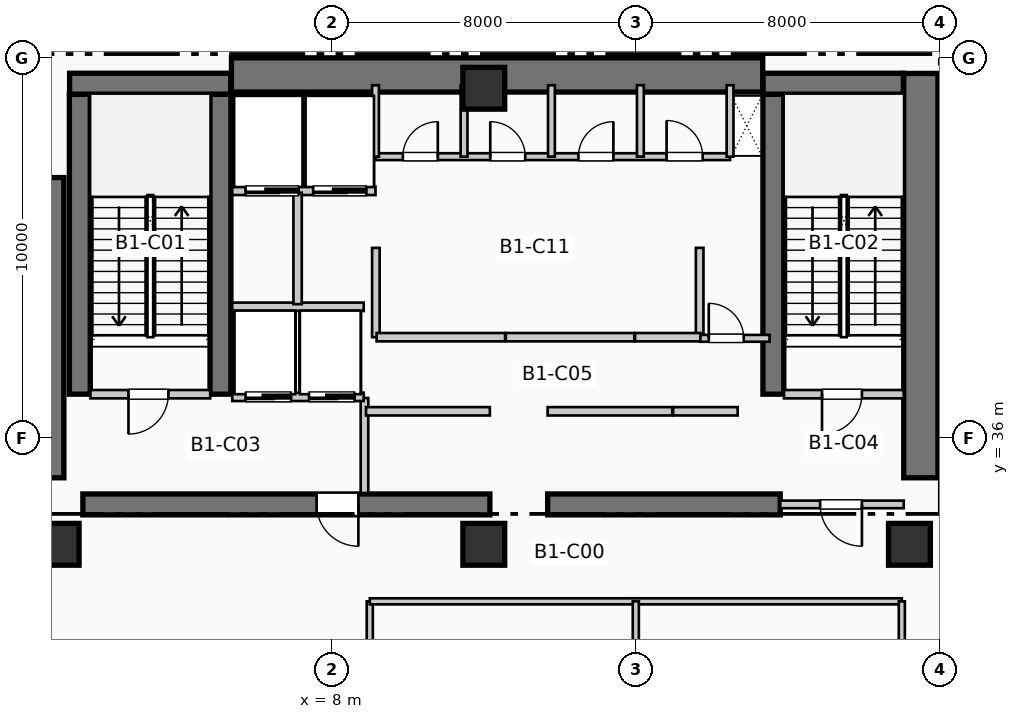
"""IFC4 building model, lengths in metres.
Left out: names, types, materials, properties, quantities, classifications, styles, units other than length and angle.
Written with IfcOpenShell. Run it as: python <this file> out.ifc"""

import sys

from ifc_helpers import new_model, si_unit, direction, frame, frame_2d, origin, origin_2d, place, context, subcontext, project, spatial, rectangle, extrude, element, fill, save


model = new_model("IFC4")
c1 = context("Model", 3, precision=1e-05, world=origin(), true_north=direction((0.0, 1.0)))
c2 = subcontext(c1, "Body", "Model", "MODEL_VIEW")
j1 = project(units=[si_unit("LENGTHUNIT", "METRE"), si_unit("PLANEANGLEUNIT", "RADIAN")], contexts=[c1])
p1 = place(None, origin())
s1 = spatial("IfcSite", under=j1, at=p1, CompositionType="ELEMENT")
p2 = place(p1, origin())
s2 = spatial("IfcBuilding", under=s1, at=p2, CompositionType="ELEMENT")
p3 = place(p2, frame((0.0, 0.0, -4.62)))
s3 = spatial("IfcBuildingStorey", under=s2, at=p3, CompositionType="ELEMENT", Elevation=-4.62)
p4 = place(p3, frame((5.36, 45.55, 0.0), z_axis=(0.0, 0.0, 1.0), x_axis=(1.0, 0.0, 0.0)))
e1 = element("IfcWall", 1, at=p4, inside=s3, PredefinedType="SHEAR", context=c2, shape_type="SweptSolid", body=[
    extrude(rectangle(XDim=13.98, YDim=0.9, at=frame_2d((6.99, 0.0))), origin(), (0.0, 0.0, 1.0), 4.62),
])
p5 = place(p3, frame((0.5, 34.95, 0.0), z_axis=(0.0, 0.0, 1.0), x_axis=(0.0, 1.0, 0.0)))
e2 = element("IfcWall", 2, at=p5, inside=s3, PredefinedType="SHEAR", context=c2, shape_type="SweptSolid", body=[
    extrude(rectangle(XDim=7.9, YDim=0.9, at=frame_2d((3.95, 0.0))), origin(), (0.0, 0.0, 1.0), 4.62),
])
p6 = place(p3, frame((23.5, 34.95, 0.0), z_axis=(0.0, 0.0, 1.0), x_axis=(0.0, 1.0, 0.0)))
e3 = element("IfcWall", 3, at=p6, inside=s3, PredefinedType="SHEAR", context=c2, shape_type="SweptSolid", body=[
    extrude(rectangle(XDim=10.64, YDim=0.9, at=frame_2d((5.32, 0.0))), origin(), (0.0, 0.0, 1.0), 4.62),
])
p7 = place(p3, frame((1.45, 34.25, 0.0), z_axis=(0.0, 0.0, 1.0), x_axis=(1.0, 0.0, 0.0)))
e4 = element("IfcWall", 4, at=p7, inside=s3, PredefinedType="SHEAR", context=c2, shape_type="SweptSolid", body=[
    extrude(rectangle(XDim=10.71, YDim=0.55, at=frame_2d((5.355, 0.0))), origin(), (0.0, 0.0, 1.0), 4.62),
])
p8 = place(p7, frame((7.25, 0.0, 0.0), z_axis=(0.0, 0.0, 1.0), x_axis=(-1.0, 0.0, 0.0)))
e5 = element("IfcOpeningElement", 5, at=p8, cuts=e4, PredefinedType="OPENING", context=c2, shape_type="SweptSolid", body=[
    extrude(rectangle(XDim=1.1, YDim=2.15, at=frame_2d((0.55, 1.075))), frame((0.0, 0.285, 0.0), z_axis=(0.0, -1.0, 0.0), x_axis=(1.0, 0.0, 0.0)), (0.0, 0.0, 1.0), 0.57),
])
p9 = place(p3, frame((13.68, 34.25, 0.0), z_axis=(0.0, 0.0, 1.0), x_axis=(1.0, 0.0, 0.0)))
e6 = element("IfcWall", 6, at=p9, inside=s3, PredefinedType="SHEAR", context=c2, shape_type="SweptSolid", body=[
    extrude(rectangle(XDim=6.12, YDim=0.55, at=frame_2d((3.06, 0.0))), origin(), (0.0, 0.0, 1.0), 4.62),
])
for number, where, z_axis, x_axis in (
    (7, (1.37, 37.15, 0.0), (0.0, 0.0, 1.0), (0.0, 1.0, 0.0)),
    (8, (5.07, 37.15, 0.0), (0.0, 0.0, 1.0), (0.0, 1.0, 0.0)),
):
    element("IfcWall", number, at=place(p3, frame(where, z_axis=z_axis, x_axis=x_axis)), inside=s3, PredefinedType="SHEAR", context=c2, shape_type="SweptSolid", body=[
        extrude(rectangle(XDim=7.89, YDim=0.55, at=frame_2d((3.945, 0.0))), origin(), (0.0, 0.0, 1.0), 4.62),
    ])
p10 = place(p3, frame((1.1, 45.32, 0.0), z_axis=(0.0, 0.0, 1.0), x_axis=(1.0, 0.0, 0.0)))
e9 = element("IfcWall", 9, at=p10, inside=s3, PredefinedType="SHEAR", context=c2, shape_type="SweptSolid", body=[
    extrude(rectangle(XDim=4.24, YDim=0.55, at=frame_2d((2.12, 0.0))), origin(), (0.0, 0.0, 1.0), 4.62),
])
p11 = place(p3, frame((19.62, 37.15, 0.0), z_axis=(0.0, 0.0, 1.0), x_axis=(0.0, 1.0, 0.0)))
e10 = element("IfcWall", 10, at=p11, inside=s3, PredefinedType="SHEAR", context=c2, shape_type="SweptSolid", body=[
    extrude(rectangle(XDim=7.89, YDim=0.55, at=frame_2d((3.945, 0.0))), origin(), (0.0, 0.0, 1.0), 4.62),
])
p12 = place(p3, frame((19.35, 45.32, 0.0), z_axis=(0.0, 0.0, 1.0), x_axis=(1.0, 0.0, 0.0)))
e11 = element("IfcWall", 11, at=p12, inside=s3, PredefinedType="SHEAR", context=c2, shape_type="SweptSolid", body=[
    extrude(rectangle(XDim=3.69, YDim=0.55, at=frame_2d((1.845, 0.0))), origin(), (0.0, 0.0, 1.0), 4.62),
])
for number, where, z_axis, x_axis in (
    (12, (0.8, 33.2, 0.0), (0.0, 0.0, 1.0), (1.0, 0.0, 0.0)),
    (13, (12.0, 33.2, 0.0), (0.0, 0.0, 1.0), (1.0, 0.0, 0.0)),
    (14, (12.0, 45.2, 0.0), (0.0, 0.0, 1.0), (1.0, 0.0, 0.0)),
    (15, (23.2, 33.2, 0.0), (0.0, 0.0, 1.0), (1.0, 0.0, 0.0)),
):
    element("IfcColumn", number, at=place(p3, frame(where, z_axis=z_axis, x_axis=x_axis)), inside=s3, PredefinedType="COLUMN", context=c2, shape_type="SweptSolid", body=[
        extrude(rectangle(XDim=1.1, YDim=1.1, at=origin_2d()), origin(), (0.0, 0.0, 1.0), 4.62),
    ])
p13 = place(p3, frame((1.65, 37.15, 0.0), z_axis=(0.0, 0.0, 1.0), x_axis=(1.0, 0.0, 0.0)))
e16 = element("IfcWall", 16, at=p13, inside=s3, PredefinedType="PARTITIONING", context=c2, shape_type="SweptSolid", body=[
    extrude(rectangle(XDim=3.15, YDim=0.22, at=frame_2d((1.575, 0.0))), origin(), (0.0, 0.0, 1.0), 4.3),
])
p14 = place(p13, frame((2.05, 0.0, 0.0), z_axis=(0.0, 0.0, 1.0), x_axis=(-1.0, 0.0, 0.0)))
e17 = element("IfcOpeningElement", 17, at=p14, cuts=e16, PredefinedType="OPENING", context=c2, shape_type="SweptSolid", body=[
    extrude(rectangle(XDim=1.05, YDim=2.15, at=frame_2d((0.525, 1.075))), frame((0.0, 0.12, 0.0), z_axis=(0.0, -1.0, 0.0), x_axis=(1.0, 0.0, 0.0)), (0.0, 0.0, 1.0), 0.24),
])
p15 = place(p3, frame((8.86, 34.55, 0.0), z_axis=(0.0, 0.0, 1.0), x_axis=(0.0, 1.0, 0.0)))
e18 = element("IfcWall", 18, at=p15, inside=s3, PredefinedType="PARTITIONING", context=c2, shape_type="SweptSolid", body=[
    extrude(rectangle(XDim=2.5, YDim=0.2, at=frame_2d((1.25, 0.0))), origin(), (0.0, 0.0, 1.0), 4.3),
])
p16 = place(p3, frame((19.9, 37.15, 0.0), z_axis=(0.0, 0.0, 1.0), x_axis=(1.0, 0.0, 0.0)))
e19 = element("IfcWall", 19, at=p16, inside=s3, PredefinedType="PARTITIONING", context=c2, shape_type="SweptSolid", body=[
    extrude(rectangle(XDim=3.15, YDim=0.22, at=frame_2d((1.575, 0.0))), origin(), (0.0, 0.0, 1.0), 4.3),
])
p17 = place(p16, frame((2.05, 0.0, 0.0), z_axis=(0.0, 0.0, 1.0), x_axis=(-1.0, 0.0, 0.0)))
e20 = element("IfcOpeningElement", 20, at=p17, cuts=e19, PredefinedType="OPENING", context=c2, shape_type="SweptSolid", body=[
    extrude(rectangle(XDim=1.05, YDim=2.15, at=frame_2d((0.525, 1.075))), frame((0.0, 0.12, 0.0), z_axis=(0.0, -1.0, 0.0), x_axis=(1.0, 0.0, 0.0)), (0.0, 0.0, 1.0), 0.24),
])
p18 = place(p3, frame((19.8, 34.25, 0.0), z_axis=(0.0, 0.0, 1.0), x_axis=(1.0, 0.0, 0.0)))
e21 = element("IfcWall", 21, at=p18, inside=s3, PredefinedType="PARTITIONING", context=c2, shape_type="SweptSolid", body=[
    extrude(rectangle(XDim=3.25, YDim=0.2, at=frame_2d((1.625, 0.0))), origin(), (0.0, 0.0, 1.0), 4.3),
])
p19 = place(p18, frame((2.15, 0.0, 0.0), z_axis=(0.0, 0.0, 1.0), x_axis=(-1.0, 0.0, 0.0)))
e22 = element("IfcOpeningElement", 22, at=p19, cuts=e21, PredefinedType="OPENING", context=c2, shape_type="SweptSolid", body=[
    extrude(rectangle(XDim=1.1, YDim=2.15, at=frame_2d((0.55, 1.075))), frame((0.0, 0.11, 0.0), z_axis=(0.0, -1.0, 0.0), x_axis=(1.0, 0.0, 0.0)), (0.0, 0.0, 1.0), 0.22),
])
p20 = place(p3, frame((5.38, 37.08, 0.0), z_axis=(0.0, 0.0, 1.0), x_axis=(1.0, 0.0, 0.0)))
e23 = element("IfcWall", 23, at=p20, inside=s3, PredefinedType="PARTITIONING", context=c2, shape_type="SweptSolid", body=[
    extrude(rectangle(XDim=3.46, YDim=0.22, at=frame_2d((1.73, 0.0))), origin(), (0.0, 0.0, 1.0), 4.3),
])
p21 = place(p20, frame((1.55, 0.0, 0.0), z_axis=(0.0, 0.0, 1.0), x_axis=(-1.0, 0.0, 0.0)))
e24 = element("IfcOpeningElement", 24, at=p21, cuts=e23, PredefinedType="OPENING", context=c2, shape_type="SweptSolid", body=[
    extrude(rectangle(XDim=1.2, YDim=2.2, at=frame_2d((0.6, 1.1))), frame((0.0, 0.12, 0.0), z_axis=(0.0, -1.0, 0.0), x_axis=(1.0, 0.0, 0.0)), (0.0, 0.0, 1.0), 0.24),
])
p22 = place(p20, frame((3.22, 0.0, 0.0), z_axis=(0.0, 0.0, 1.0), x_axis=(-1.0, 0.0, 0.0)))
e25 = element("IfcOpeningElement", 25, at=p22, cuts=e23, PredefinedType="OPENING", context=c2, shape_type="SweptSolid", body=[
    extrude(rectangle(XDim=1.2, YDim=2.2, at=frame_2d((0.6, 1.1))), frame((0.0, 0.12, 0.0), z_axis=(0.0, -1.0, 0.0), x_axis=(1.0, 0.0, 0.0)), (0.0, 0.0, 1.0), 0.24),
])
p23 = place(p3, frame((5.38, 39.45, 0.0), z_axis=(0.0, 0.0, 1.0), x_axis=(1.0, 0.0, 0.0)))
e26 = element("IfcWall", 26, at=p23, inside=s3, PredefinedType="PARTITIONING", context=c2, shape_type="SweptSolid", body=[
    extrude(rectangle(XDim=3.46, YDim=0.22, at=frame_2d((1.73, 0.0))), origin(), (0.0, 0.0, 1.0), 4.3),
])
p24 = place(p3, frame((5.38, 42.5, 0.0), z_axis=(0.0, 0.0, 1.0), x_axis=(1.0, 0.0, 0.0)))
e27 = element("IfcWall", 27, at=p24, inside=s3, PredefinedType="PARTITIONING", context=c2, shape_type="SweptSolid", body=[
    extrude(rectangle(XDim=3.77, YDim=0.22, at=frame_2d((1.885, 0.0))), origin(), (0.0, 0.0, 1.0), 4.3),
])
p25 = place(p24, frame((1.75, 0.0, 0.0), z_axis=(0.0, 0.0, 1.0), x_axis=(-1.0, 0.0, 0.0)))
e28 = element("IfcOpeningElement", 28, at=p25, cuts=e27, PredefinedType="OPENING", context=c2, shape_type="SweptSolid", body=[
    extrude(rectangle(XDim=1.4, YDim=2.2, at=frame_2d((0.7, 1.1))), frame((0.0, 0.12, 0.0), z_axis=(0.0, -1.0, 0.0), x_axis=(1.0, 0.0, 0.0)), (0.0, 0.0, 1.0), 0.24),
])
p26 = place(p24, frame((3.53, 0.0, 0.0), z_axis=(0.0, 0.0, 1.0), x_axis=(-1.0, 0.0, 0.0)))
e29 = element("IfcOpeningElement", 29, at=p26, cuts=e27, PredefinedType="OPENING", context=c2, shape_type="SweptSolid", body=[
    extrude(rectangle(XDim=1.4, YDim=2.2, at=frame_2d((0.7, 1.1))), frame((0.0, 0.12, 0.0), z_axis=(0.0, -1.0, 0.0), x_axis=(1.0, 0.0, 0.0)), (0.0, 0.0, 1.0), 0.24),
])
p27 = place(p3, frame((7.1, 39.52, 0.0), z_axis=(0.0, 0.0, 1.0), x_axis=(0.0, 1.0, 0.0)))
e30 = element("IfcWall", 30, at=p27, inside=s3, PredefinedType="PARTITIONING", context=c2, shape_type="SweptSolid", body=[
    extrude(rectangle(XDim=2.93, YDim=0.22, at=frame_2d((1.465, 0.0))), origin(), (0.0, 0.0, 1.0), 4.3),
])
for number, where, z_axis, x_axis in (
    (31, (9.16, 38.65, 0.0), (0.0, 0.0, 1.0), (0.0, 1.0, 0.0)),
    (32, (17.68, 38.65, 0.0), (0.0, 0.0, 1.0), (0.0, 1.0, 0.0)),
):
    element("IfcWall", number, at=place(p3, frame(where, z_axis=z_axis, x_axis=x_axis)), inside=s3, PredefinedType="PARTITIONING", context=c2, shape_type="SweptSolid", body=[
        extrude(rectangle(XDim=2.35, YDim=0.2, at=frame_2d((1.175, 0.0))), origin(), (0.0, 0.0, 1.0), 4.3),
    ])
p28 = place(p3, frame((17.68, 38.62, 0.0), z_axis=(0.0, 0.0, 1.0), x_axis=(1.0, 0.0, 0.0)))
e33 = element("IfcWall", 33, at=p28, inside=s3, PredefinedType="PARTITIONING", context=c2, shape_type="SweptSolid", body=[
    extrude(rectangle(XDim=1.84, YDim=0.18, at=frame_2d((0.92, 0.0))), origin(), (0.0, 0.0, 1.0), 4.3),
])
p29 = place(p28, frame((0.24, 0.0, 0.0)))
e34 = element("IfcOpeningElement", 34, at=p29, cuts=e33, PredefinedType="OPENING", context=c2, shape_type="SweptSolid", body=[
    extrude(rectangle(XDim=0.92, YDim=2.1, at=frame_2d((0.46, 1.05))), frame((0.0, 0.1, 0.0), z_axis=(0.0, -1.0, 0.0), x_axis=(1.0, 0.0, 0.0)), (0.0, 0.0, 1.0), 0.2),
])
p30 = place(p3, frame((8.9, 36.7, 0.0), z_axis=(0.0, 0.0, 1.0), x_axis=(1.0, 0.0, 0.0)))
e35 = element("IfcWall", 35, at=p30, inside=s3, PredefinedType="PARTITIONING", context=c2, shape_type="SweptSolid", body=[
    extrude(rectangle(XDim=3.26, YDim=0.22, at=frame_2d((1.63, 0.0))), origin(), (0.0, 0.0, 1.0), 4.3),
])
p31 = place(p3, frame((9.18, 38.65, 0.0), z_axis=(0.0, 0.0, 1.0), x_axis=(1.0, 0.0, 0.0)))
e36 = element("IfcWall", 36, at=p31, inside=s3, PredefinedType="PARTITIONING", context=c2, shape_type="SweptSolid", body=[
    extrude(rectangle(XDim=3.38, YDim=0.22, at=frame_2d((1.69, 0.0))), origin(), (0.0, 0.0, 1.0), 4.3),
])
p32 = place(p3, frame((13.68, 36.7, 0.0), z_axis=(0.0, 0.0, 1.0), x_axis=(1.0, 0.0, 0.0)))
e37 = element("IfcWall", 37, at=p32, inside=s3, PredefinedType="PARTITIONING", context=c2, shape_type="SweptSolid", body=[
    extrude(rectangle(XDim=3.28, YDim=0.22, at=frame_2d((1.64, 0.0))), origin(), (0.0, 0.0, 1.0), 4.3),
])
p33 = place(p3, frame((12.58, 38.65, 0.0), z_axis=(0.0, 0.0, 1.0), x_axis=(1.0, 0.0, 0.0)))
e38 = element("IfcWall", 38, at=p33, inside=s3, PredefinedType="PARTITIONING", context=c2, shape_type="SweptSolid", body=[
    extrude(rectangle(XDim=3.38, YDim=0.22, at=frame_2d((1.69, 0.0))), origin(), (0.0, 0.0, 1.0), 4.3),
])
p34 = place(p3, frame((16.98, 36.7, 0.0), z_axis=(0.0, 0.0, 1.0), x_axis=(1.0, 0.0, 0.0)))
e39 = element("IfcWall", 39, at=p34, inside=s3, PredefinedType="PARTITIONING", context=c2, shape_type="SweptSolid", body=[
    extrude(rectangle(XDim=1.7, YDim=0.22, at=frame_2d((0.85, 0.0))), origin(), (0.0, 0.0, 1.0), 4.3),
])
p35 = place(p3, frame((15.98, 38.65, 0.0), z_axis=(0.0, 0.0, 1.0), x_axis=(1.0, 0.0, 0.0)))
e40 = element("IfcWall", 40, at=p35, inside=s3, PredefinedType="PARTITIONING", context=c2, shape_type="SweptSolid", body=[
    extrude(rectangle(XDim=1.72, YDim=0.22, at=frame_2d((0.86, 0.0))), origin(), (0.0, 0.0, 1.0), 4.3),
])
p36 = place(p3, frame((9.15, 43.4, 0.0), z_axis=(0.0, 0.0, 1.0), x_axis=(1.0, 0.0, 0.0)))
e41 = element("IfcWall", 41, at=p36, inside=s3, PredefinedType="PLUMBINGWALL", context=c2, shape_type="SweptSolid", body=[
    extrude(rectangle(XDim=9.33, YDim=0.18, at=frame_2d((4.665, 0.0))), origin(), (0.0, 0.0, 1.0), 4.3),
])
p37 = place(p36, frame((0.72, 0.0, 0.0)))
e42 = element("IfcOpeningElement", 42, at=p37, cuts=e41, PredefinedType="OPENING", context=c2, shape_type="SweptSolid", body=[
    extrude(rectangle(XDim=0.92, YDim=2.1, at=frame_2d((0.46, 1.05))), frame((0.0, 0.1, 0.0), z_axis=(0.0, -1.0, 0.0), x_axis=(1.0, 0.0, 0.0)), (0.0, 0.0, 1.0), 0.2),
])
p38 = place(p36, frame((3.02, 0.0, 0.0)))
e43 = element("IfcOpeningElement", 43, at=p38, cuts=e41, PredefinedType="OPENING", context=c2, shape_type="SweptSolid", body=[
    extrude(rectangle(XDim=0.92, YDim=2.1, at=frame_2d((0.46, 1.05))), frame((0.0, 0.1, 0.0), z_axis=(0.0, -1.0, 0.0), x_axis=(1.0, 0.0, 0.0)), (0.0, 0.0, 1.0), 0.2),
])
p39 = place(p36, frame((5.34, 0.0, 0.0)))
e44 = element("IfcOpeningElement", 44, at=p39, cuts=e41, PredefinedType="OPENING", context=c2, shape_type="SweptSolid", body=[
    extrude(rectangle(XDim=0.92, YDim=2.1, at=frame_2d((0.46, 1.05))), frame((0.0, 0.1, 0.0), z_axis=(0.0, -1.0, 0.0), x_axis=(1.0, 0.0, 0.0)), (0.0, 0.0, 1.0), 0.2),
])
p40 = place(p36, frame((7.66, 0.0, 0.0)))
e45 = element("IfcOpeningElement", 45, at=p40, cuts=e41, PredefinedType="OPENING", context=c2, shape_type="SweptSolid", body=[
    extrude(rectangle(XDim=0.95, YDim=2.1, at=frame_2d((0.475, 1.05))), frame((0.0, 0.1, 0.0), z_axis=(0.0, -1.0, 0.0), x_axis=(1.0, 0.0, 0.0)), (0.0, 0.0, 1.0), 0.2),
])
for number, where, z_axis, x_axis in (
    (46, (9.15, 43.4, 0.0), (0.0, 0.0, 1.0), (0.0, 1.0, 0.0)),
    (47, (18.48, 43.4, 0.0), (0.0, 0.0, 1.0), (0.0, 1.0, 0.0)),
    (48, (11.48, 43.4, 0.0), (0.0, 0.0, 1.0), (0.0, 1.0, 0.0)),
    (49, (13.78, 43.4, 0.0), (0.0, 0.0, 1.0), (0.0, 1.0, 0.0)),
    (50, (16.12, 43.4, 0.0), (0.0, 0.0, 1.0), (0.0, 1.0, 0.0)),
):
    element("IfcWall", number, at=place(p3, frame(where, z_axis=z_axis, x_axis=x_axis)), inside=s3, PredefinedType="PLUMBINGWALL", context=c2, shape_type="SweptSolid", body=[
        extrude(rectangle(XDim=1.88, YDim=0.18, at=frame_2d((0.94, 0.0))), origin(), (0.0, 0.0, 1.0), 4.3),
    ])
p41 = place(p3, frame((9.0, 26.2, 0.0), z_axis=(0.0, 0.0, 1.0), x_axis=(0.0, 1.0, 0.0)))
e51 = element("IfcWall", 51, at=p41, inside=s3, PredefinedType="PARTITIONING", context=c2, shape_type="SweptSolid", body=[
    extrude(rectangle(XDim=5.5, YDim=0.16, at=frame_2d((2.75, 0.0))), origin(), (0.0, 0.0, 1.0), 4.3),
])
p42 = place(p3, frame((9.0, 31.7, 0.0), z_axis=(0.0, 0.0, 1.0), x_axis=(1.0, 0.0, 0.0)))
e52 = element("IfcWall", 52, at=p42, inside=s3, PredefinedType="PARTITIONING", context=c2, shape_type="SweptSolid", body=[
    extrude(rectangle(XDim=14.0, YDim=0.16, at=frame_2d((7.0, 0.0))), origin(), (0.0, 0.0, 1.0), 4.3),
])
p43 = place(p3, frame((23.0, 26.2, 0.0), z_axis=(0.0, 0.0, 1.0), x_axis=(0.0, 1.0, 0.0)))
e53 = element("IfcWall", 53, at=p43, inside=s3, PredefinedType="PARTITIONING", context=c2, shape_type="SweptSolid", body=[
    extrude(rectangle(XDim=5.5, YDim=0.16, at=frame_2d((2.75, 0.0))), origin(), (0.0, 0.0, 1.0), 3.485),
])
p44 = place(p3, frame((16.0, 26.2, 0.0), z_axis=(0.0, 0.0, 1.0), x_axis=(0.0, 1.0, 0.0)))
e54 = element("IfcWall", 54, at=p44, inside=s3, PredefinedType="PARTITIONING", context=c2, shape_type="SweptSolid", body=[
    extrude(rectangle(XDim=5.5, YDim=0.16, at=frame_2d((2.75, 0.0))), origin(), (0.0, 0.0, 1.0), 4.3),
])
p45 = place(p14, origin())
e55 = element("IfcDoor", 55, at=p45, inside=s3, OperationType="SINGLE_SWING_LEFT", PredefinedType="DOOR", context=c2, shape_type="SweptSolid", body=[
    extrude(rectangle(XDim=1.05, YDim=2.15, at=frame_2d((0.525, 1.075))), frame((0.0, 0.025, 0.0), z_axis=(0.0, -1.0, 0.0), x_axis=(1.0, 0.0, 0.0)), (0.0, 0.0, 1.0), 0.05),
])
fill(e17, e55)
p46 = place(p8, origin())
e56 = element("IfcDoor", 56, at=p46, inside=s3, OperationType="SINGLE_SWING_RIGHT", PredefinedType="DOOR", context=c2, shape_type="SweptSolid", body=[
    extrude(rectangle(XDim=1.1, YDim=2.15, at=frame_2d((0.55, 1.075))), frame((0.0, 0.025, 0.0), z_axis=(0.0, -1.0, 0.0), x_axis=(1.0, 0.0, 0.0)), (0.0, 0.0, 1.0), 0.05),
])
fill(e5, e56)
p47 = place(p17, origin())
e57 = element("IfcDoor", 57, at=p47, inside=s3, OperationType="SINGLE_SWING_LEFT", PredefinedType="DOOR", context=c2, shape_type="SweptSolid", body=[
    extrude(rectangle(XDim=1.05, YDim=2.15, at=frame_2d((0.525, 1.075))), frame((0.0, 0.025, 0.0), z_axis=(0.0, -1.0, 0.0), x_axis=(1.0, 0.0, 0.0)), (0.0, 0.0, 1.0), 0.05),
])
fill(e20, e57)
p48 = place(p19, origin())
e58 = element("IfcDoor", 58, at=p48, inside=s3, OperationType="SINGLE_SWING_RIGHT", PredefinedType="DOOR", context=c2, shape_type="SweptSolid", body=[
    extrude(rectangle(XDim=1.1, YDim=2.15, at=frame_2d((0.55, 1.075))), frame((0.0, 0.025, 0.0), z_axis=(0.0, -1.0, 0.0), x_axis=(1.0, 0.0, 0.0)), (0.0, 0.0, 1.0), 0.05),
])
fill(e22, e58)
p49 = place(p21, origin())
e59 = element("IfcDoor", 59, at=p49, inside=s3, OperationType="SLIDING_TO_RIGHT", PredefinedType="DOOR", context=c2, shape_type="SweptSolid", body=[
    extrude(rectangle(XDim=1.2, YDim=2.2, at=frame_2d((0.6, 1.1))), frame((0.0, 0.025, 0.0), z_axis=(0.0, -1.0, 0.0), x_axis=(1.0, 0.0, 0.0)), (0.0, 0.0, 1.0), 0.05),
])
fill(e24, e59)
p50 = place(p22, origin())
e60 = element("IfcDoor", 60, at=p50, inside=s3, OperationType="SLIDING_TO_RIGHT", PredefinedType="DOOR", context=c2, shape_type="SweptSolid", body=[
    extrude(rectangle(XDim=1.2, YDim=2.2, at=frame_2d((0.6, 1.1))), frame((0.0, 0.025, 0.0), z_axis=(0.0, -1.0, 0.0), x_axis=(1.0, 0.0, 0.0)), (0.0, 0.0, 1.0), 0.05),
])
fill(e25, e60)
p51 = place(p25, origin())
e61 = element("IfcDoor", 61, at=p51, inside=s3, OperationType="SLIDING_TO_LEFT", PredefinedType="DOOR", context=c2, shape_type="SweptSolid", body=[
    extrude(rectangle(XDim=1.4, YDim=2.2, at=frame_2d((0.7, 1.1))), frame((0.0, 0.025, 0.0), z_axis=(0.0, -1.0, 0.0), x_axis=(1.0, 0.0, 0.0)), (0.0, 0.0, 1.0), 0.05),
])
fill(e28, e61)
p52 = place(p26, origin())
e62 = element("IfcDoor", 62, at=p52, inside=s3, OperationType="SLIDING_TO_LEFT", PredefinedType="DOOR", context=c2, shape_type="SweptSolid", body=[
    extrude(rectangle(XDim=1.4, YDim=2.2, at=frame_2d((0.7, 1.1))), frame((0.0, 0.025, 0.0), z_axis=(0.0, -1.0, 0.0), x_axis=(1.0, 0.0, 0.0)), (0.0, 0.0, 1.0), 0.05),
])
fill(e29, e62)
p53 = place(p29, origin())
e63 = element("IfcDoor", 63, at=p53, inside=s3, OperationType="SINGLE_SWING_LEFT", PredefinedType="DOOR", context=c2, shape_type="SweptSolid", body=[
    extrude(rectangle(XDim=0.92, YDim=2.1, at=frame_2d((0.46, 1.05))), frame((0.0, 0.025, 0.0), z_axis=(0.0, -1.0, 0.0), x_axis=(1.0, 0.0, 0.0)), (0.0, 0.0, 1.0), 0.05),
])
fill(e34, e63)
p54 = place(p37, origin())
e64 = element("IfcDoor", 64, at=p54, inside=s3, OperationType="SINGLE_SWING_RIGHT", PredefinedType="DOOR", context=c2, shape_type="SweptSolid", body=[
    extrude(rectangle(XDim=0.92, YDim=2.1, at=frame_2d((0.46, 1.05))), frame((0.0, 0.025, 0.0), z_axis=(0.0, -1.0, 0.0), x_axis=(1.0, 0.0, 0.0)), (0.0, 0.0, 1.0), 0.05),
])
fill(e42, e64)
p55 = place(p38, origin())
e65 = element("IfcDoor", 65, at=p55, inside=s3, OperationType="SINGLE_SWING_LEFT", PredefinedType="DOOR", context=c2, shape_type="SweptSolid", body=[
    extrude(rectangle(XDim=0.92, YDim=2.1, at=frame_2d((0.46, 1.05))), frame((0.0, 0.025, 0.0), z_axis=(0.0, -1.0, 0.0), x_axis=(1.0, 0.0, 0.0)), (0.0, 0.0, 1.0), 0.05),
])
fill(e43, e65)
p56 = place(p39, origin())
e66 = element("IfcDoor", 66, at=p56, inside=s3, OperationType="SINGLE_SWING_RIGHT", PredefinedType="DOOR", context=c2, shape_type="SweptSolid", body=[
    extrude(rectangle(XDim=0.92, YDim=2.1, at=frame_2d((0.46, 1.05))), frame((0.0, 0.025, 0.0), z_axis=(0.0, -1.0, 0.0), x_axis=(1.0, 0.0, 0.0)), (0.0, 0.0, 1.0), 0.05),
])
fill(e44, e66)
p57 = place(p40, origin())
e67 = element("IfcDoor", 67, at=p57, inside=s3, OperationType="SINGLE_SWING_LEFT", PredefinedType="DOOR", context=c2, shape_type="SweptSolid", body=[
    extrude(rectangle(XDim=0.95, YDim=2.1, at=frame_2d((0.475, 1.05))), frame((0.0, 0.025, 0.0), z_axis=(0.0, -1.0, 0.0), x_axis=(1.0, 0.0, 0.0)), (0.0, 0.0, 1.0), 0.05),
])
fill(e45, e67)
save(model, sys.argv[1])
